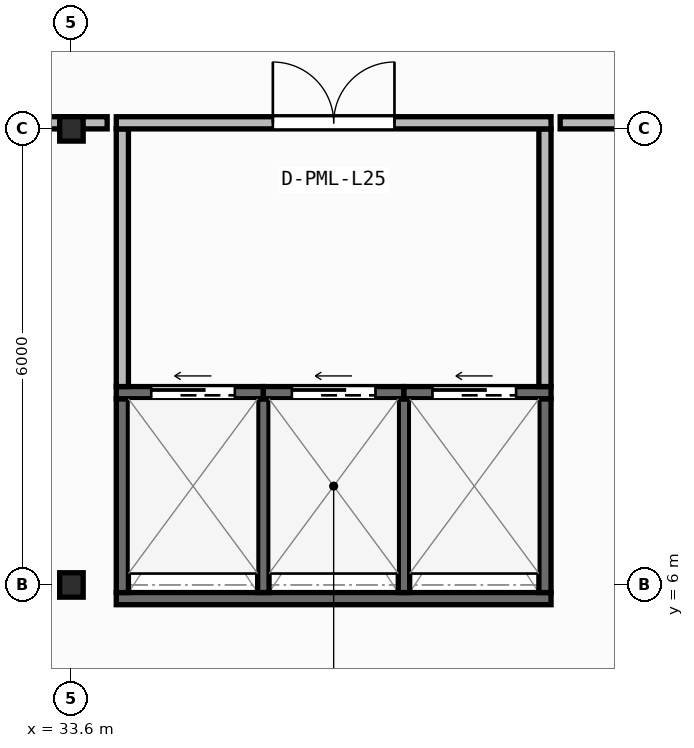
"""IFC4 building model, lengths in metres.
Left out: names, types, materials, properties, quantities, classifications, styles, units other than length and angle.
Written with IfcOpenShell. Run it as: python <this file> out.ifc"""

import sys

from ifc_helpers import new_model, si_unit, direction, frame, frame_2d, origin, origin_2d, place, context, subcontext, project, spatial, rectangle, i_section, extrude, element, fill, save


model = new_model("IFC4")
c1 = context("Model", 3, precision=1e-05, world=origin(), true_north=direction((0.0, 1.0)))
c2 = subcontext(c1, "Body", "Model", "MODEL_VIEW")
j1 = project(units=[si_unit("LENGTHUNIT", "METRE"), si_unit("PLANEANGLEUNIT", "RADIAN")], contexts=[c1])
p1 = place(None, origin())
s1 = spatial("IfcSite", under=j1, at=p1, CompositionType="ELEMENT")
p2 = place(p1, origin())
s2 = spatial("IfcBuilding", under=s1, at=p2, CompositionType="ELEMENT")
p3 = place(p2, frame((0.0, 0.0, 103.35)))
s3 = spatial("IfcBuildingStorey", under=s2, at=p3, CompositionType="ELEMENT", Elevation=103.35)
for number, where, z_axis, x_axis in (
    (1, (33.6, 6.0, 0.0), (0.0, 0.0, 1.0), (1.0, 0.0, 0.0)),
    (2, (33.6, 12.0, 0.0), (0.0, 0.0, 1.0), (1.0, 0.0, 0.0)),
):
    element("IfcColumn", number, at=place(p3, frame(where, z_axis=z_axis, x_axis=x_axis)), inside=s3, PredefinedType="COLUMN", context=c2, shape_type="SweptSolid", body=[
        extrude(i_section(OverallWidth=0.309, OverallDepth=0.321, WebThickness=0.014, FlangeThickness=0.022, FilletRadius=0.017, at=origin_2d()), origin(), (0.0, 0.0, 1.0), 3.95),
    ])
p4 = place(p3, frame((34.19, 5.82, 0.0), z_axis=(0.0, 0.0, 1.0), x_axis=(1.0, 0.0, 0.0)))
e3 = element("IfcWall", 3, at=p4, inside=s3, PredefinedType="SHEAR", context=c2, shape_type="SweptSolid", body=[
    extrude(rectangle(XDim=5.72, YDim=0.16, at=frame_2d((2.86, 0.0))), origin(), (0.0, 0.0, 1.0), 3.71),
])
for number, where, z_axis, x_axis in (
    (4, (34.27, 5.9, 0.0), (0.0, 0.0, 1.0), (0.0, 1.0, 0.0)),
    (5, (39.83, 5.9, 0.0), (0.0, 0.0, 1.0), (0.0, 1.0, 0.0)),
):
    element("IfcWall", number, at=place(p3, frame(where, z_axis=z_axis, x_axis=x_axis)), inside=s3, PredefinedType="SHEAR", context=c2, shape_type="SweptSolid", body=[
        extrude(rectangle(XDim=2.55, YDim=0.16, at=frame_2d((1.275, 0.0))), origin(), (0.0, 0.0, 1.0), 3.71),
    ])
for number, where, z_axis, x_axis in (
    (6, (36.125, 5.9, 0.0), (0.0, 0.0, 1.0), (0.0, 1.0, 0.0)),
    (7, (37.975, 5.9, 0.0), (0.0, 0.0, 1.0), (0.0, 1.0, 0.0)),
):
    element("IfcWall", number, at=place(p3, frame(where, z_axis=z_axis, x_axis=x_axis)), inside=s3, PredefinedType="SHEAR", context=c2, shape_type="SweptSolid", body=[
        extrude(rectangle(XDim=2.55, YDim=0.15, at=frame_2d((1.275, 0.0))), origin(), (0.0, 0.0, 1.0), 3.71),
    ])
p5 = place(p3, frame((34.19, 8.53, 0.0), z_axis=(0.0, 0.0, 1.0), x_axis=(1.0, 0.0, 0.0)))
e8 = element("IfcWall", 8, at=p5, inside=s3, PredefinedType="SHEAR", context=c2, shape_type="SweptSolid", body=[
    extrude(rectangle(XDim=1.935, YDim=0.16, at=frame_2d((0.968, 0.0))), origin(), (0.0, 0.0, 1.0), 3.71),
])
p6 = place(p5, frame((0.46, 0.0, 0.0)))
e9 = element("IfcOpeningElement", 9, at=p6, cuts=e8, PredefinedType="OPENING", context=c2, shape_type="SweptSolid", body=[
    extrude(rectangle(XDim=1.1, YDim=2.15, at=frame_2d((0.55, 1.075))), frame((0.0, 0.09, 0.0), z_axis=(0.0, -1.0, 0.0), x_axis=(1.0, 0.0, 0.0)), (0.0, 0.0, 1.0), 0.18),
])
p7 = place(p3, frame((36.125, 8.53, 0.0), z_axis=(0.0, 0.0, 1.0), x_axis=(1.0, 0.0, 0.0)))
e10 = element("IfcWall", 10, at=p7, inside=s3, PredefinedType="SHEAR", context=c2, shape_type="SweptSolid", body=[
    extrude(rectangle(XDim=1.85, YDim=0.16, at=frame_2d((0.925, 0.0))), origin(), (0.0, 0.0, 1.0), 3.71),
])
p8 = place(p7, frame((0.375, 0.0, 0.0)))
e11 = element("IfcOpeningElement", 11, at=p8, cuts=e10, PredefinedType="OPENING", context=c2, shape_type="SweptSolid", body=[
    extrude(rectangle(XDim=1.1, YDim=2.15, at=frame_2d((0.55, 1.075))), frame((0.0, 0.09, 0.0), z_axis=(0.0, -1.0, 0.0), x_axis=(1.0, 0.0, 0.0)), (0.0, 0.0, 1.0), 0.18),
])
p9 = place(p3, frame((37.975, 8.53, 0.0), z_axis=(0.0, 0.0, 1.0), x_axis=(1.0, 0.0, 0.0)))
e12 = element("IfcWall", 12, at=p9, inside=s3, PredefinedType="SHEAR", context=c2, shape_type="SweptSolid", body=[
    extrude(rectangle(XDim=1.935, YDim=0.16, at=frame_2d((0.967, 0.0))), origin(), (0.0, 0.0, 1.0), 3.71),
])
p10 = place(p9, frame((0.375, 0.0, 0.0)))
e13 = element("IfcOpeningElement", 13, at=p10, cuts=e12, PredefinedType="OPENING", context=c2, shape_type="SweptSolid", body=[
    extrude(rectangle(XDim=1.1, YDim=2.15, at=frame_2d((0.55, 1.075))), frame((0.0, 0.09, 0.0), z_axis=(0.0, -1.0, 0.0), x_axis=(1.0, 0.0, 0.0)), (0.0, 0.0, 1.0), 0.18),
])
for number, where, z_axis, x_axis in (
    (14, (34.27, 8.61, 0.0), (0.0, 0.0, 1.0), (0.0, 1.0, 0.0)),
    (15, (39.83, 8.61, 0.0), (0.0, 0.0, 1.0), (0.0, 1.0, 0.0)),
):
    element("IfcWall", number, at=place(p3, frame(where, z_axis=z_axis, x_axis=x_axis)), inside=s3, PredefinedType="PARTITIONING", context=c2, shape_type="SweptSolid", body=[
        extrude(rectangle(XDim=3.39, YDim=0.16, at=frame_2d((1.695, 0.0))), origin(), (0.0, 0.0, 1.0), 3.71),
    ])
p11 = place(p3, frame((34.19, 12.08, 0.0), z_axis=(0.0, 0.0, 1.0), x_axis=(1.0, 0.0, 0.0)))
e16 = element("IfcWall", 16, at=p11, inside=s3, PredefinedType="PARTITIONING", context=c2, shape_type="SweptSolid", body=[
    extrude(rectangle(XDim=5.72, YDim=0.16, at=frame_2d((2.86, 0.0))), origin(), (0.0, 0.0, 1.0), 3.083),
])
p12 = place(p11, frame((2.06, 0.0, 0.0)))
e17 = element("IfcOpeningElement", 17, at=p12, cuts=e16, PredefinedType="OPENING", context=c2, shape_type="SweptSolid", body=[
    extrude(rectangle(XDim=1.6, YDim=2.05, at=frame_2d((0.8, 1.025))), frame((0.0, 0.09, 0.0), z_axis=(0.0, -1.0, 0.0), x_axis=(1.0, 0.0, 0.0)), (0.0, 0.0, 1.0), 0.18),
])
p13 = place(p3, frame((31.63, 12.08, 0.0), z_axis=(0.0, 0.0, 1.0), x_axis=(1.0, 0.0, 0.0)))
e18 = element("IfcWall", 18, at=p13, inside=s3, PredefinedType="PARTITIONING", context=c2, shape_type="SweptSolid", body=[
    extrude(rectangle(XDim=2.44, YDim=0.16, at=frame_2d((1.22, 0.0))), origin(), (0.0, 0.0, 1.0), 3.083),
])
p14 = place(p3, frame((40.03, 12.08, 0.0), z_axis=(0.0, 0.0, 1.0), x_axis=(1.0, 0.0, 0.0)))
e19 = element("IfcWall", 19, at=p14, inside=s3, PredefinedType="PARTITIONING", context=c2, shape_type="SweptSolid", body=[
    extrude(rectangle(XDim=2.781, YDim=0.16, at=frame_2d((1.39, 0.0))), origin(), (0.0, 0.0, 1.0), 3.083),
])
p15 = place(p6, origin())
e20 = element("IfcDoor", 20, at=p15, inside=s3, OperationType="SLIDING_TO_LEFT", PredefinedType="DOOR", context=c2, shape_type="SweptSolid", body=[
    extrude(rectangle(XDim=1.1, YDim=2.15, at=frame_2d((0.55, 1.075))), frame((0.0, 0.025, 0.0), z_axis=(0.0, -1.0, 0.0), x_axis=(1.0, 0.0, 0.0)), (0.0, 0.0, 1.0), 0.05),
])
fill(e9, e20)
p16 = place(p8, origin())
e21 = element("IfcDoor", 21, at=p16, inside=s3, OperationType="SLIDING_TO_LEFT", PredefinedType="DOOR", context=c2, shape_type="SweptSolid", body=[
    extrude(rectangle(XDim=1.1, YDim=2.15, at=frame_2d((0.55, 1.075))), frame((0.0, 0.025, 0.0), z_axis=(0.0, -1.0, 0.0), x_axis=(1.0, 0.0, 0.0)), (0.0, 0.0, 1.0), 0.05),
])
fill(e11, e21)
p17 = place(p10, origin())
e22 = element("IfcDoor", 22, at=p17, inside=s3, OperationType="SLIDING_TO_LEFT", PredefinedType="DOOR", context=c2, shape_type="SweptSolid", body=[
    extrude(rectangle(XDim=1.1, YDim=2.15, at=frame_2d((0.55, 1.075))), frame((0.0, 0.025, 0.0), z_axis=(0.0, -1.0, 0.0), x_axis=(1.0, 0.0, 0.0)), (0.0, 0.0, 1.0), 0.05),
])
fill(e13, e22)
p18 = place(p12, origin())
e23 = element("IfcDoor", 23, at=p18, inside=s3, OperationType="DOUBLE_DOOR_SINGLE_SWING", PredefinedType="DOOR", context=c2, shape_type="SweptSolid", body=[
    extrude(rectangle(XDim=1.6, YDim=2.05, at=frame_2d((0.8, 1.025))), frame((0.0, 0.025, 0.0), z_axis=(0.0, -1.0, 0.0), x_axis=(1.0, 0.0, 0.0)), (0.0, 0.0, 1.0), 0.05),
])
fill(e17, e23)
save(model, sys.argv[1])
